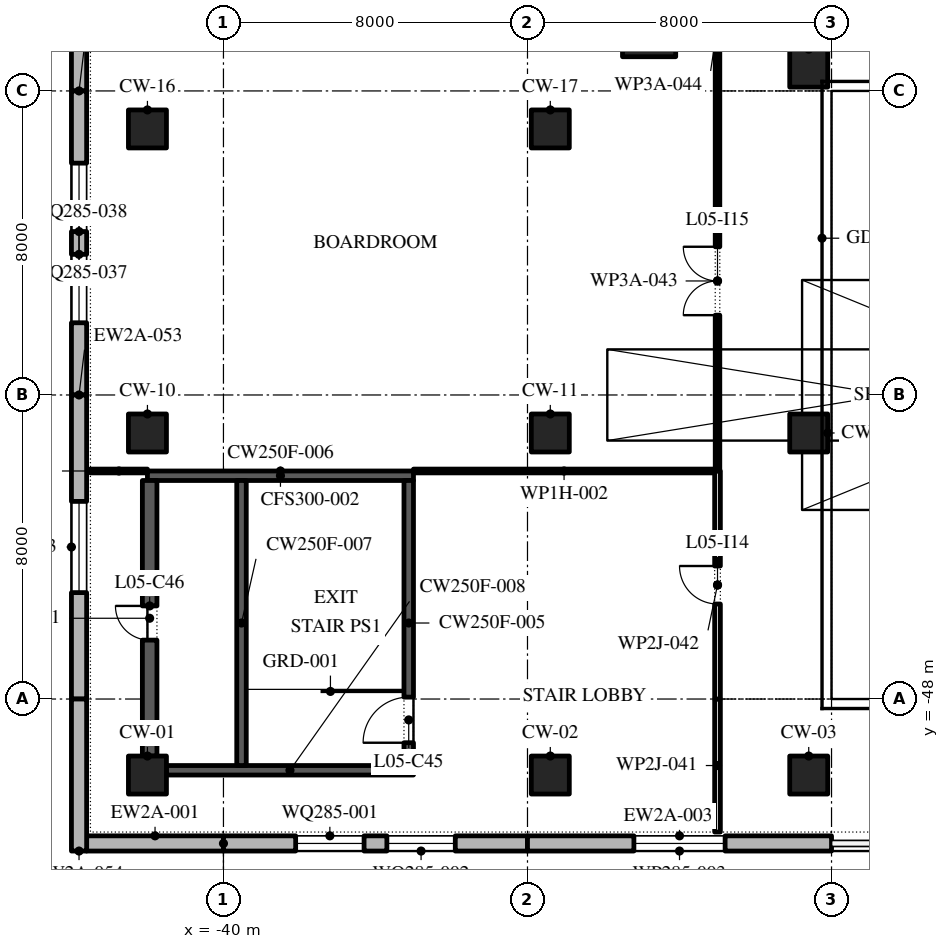
"""IFC4 building model, lengths in metres.
Left out: names, types, materials, properties, quantities, classifications, styles, units other than length and angle.
Written with IfcOpenShell. Run it as: python <this file> out.ifc"""

import sys

from ifc_helpers import new_model, si_unit, direction, frame, frame_2d, origin, origin_2d, place, context, subcontext, project, spatial, polyline, rectangle, outline, extrude, element, fill, save


model = new_model("IFC4")
c1 = context("Model", 3, precision=1e-05, world=origin(), true_north=direction((0.0, 1.0)))
c2 = subcontext(c1, "Body", "Model", "MODEL_VIEW")
j1 = project(units=[si_unit("LENGTHUNIT", "METRE"), si_unit("PLANEANGLEUNIT", "RADIAN")], contexts=[c1])
p1 = place(None, origin())
s1 = spatial("IfcSite", under=j1, at=p1, CompositionType="ELEMENT")
p2 = place(p1, origin())
s2 = spatial("IfcBuilding", under=s1, at=p2, CompositionType="ELEMENT")
p3 = place(p2, frame((0.0, 0.0, 28.8)))
s3 = spatial("IfcBuildingStorey", under=s2, at=p3, CompositionType="ELEMENT", Elevation=28.8)
for number, where, z_axis, x_axis in (
    (1, (-42.0, -50.0, 0.0), (0.0, 0.0, 1.0), (1.0, 0.0, 0.0)),
    (2, (-31.4, -50.0, 0.0), (0.0, 0.0, 1.0), (1.0, 0.0, 0.0)),
    (3, (-24.6, -50.0, 0.0), (0.0, 0.0, 1.0), (1.0, 0.0, 0.0)),
    (4, (-42.0, -41.0, 0.0), (0.0, 0.0, 1.0), (1.0, 0.0, 0.0)),
    (5, (-31.4, -41.0, 0.0), (0.0, 0.0, 1.0), (1.0, 0.0, 0.0)),
    (6, (-24.6, -41.0, 0.0), (0.0, 0.0, 1.0), (1.0, 0.0, 0.0)),
    (7, (-42.0, -33.0, 0.0), (0.0, 0.0, 1.0), (1.0, 0.0, 0.0)),
    (8, (-31.4, -33.0, 0.0), (0.0, 0.0, 1.0), (1.0, 0.0, 0.0)),
    (9, (-24.6, -31.4, 0.0), (0.0, 0.0, 1.0), (1.0, 0.0, 0.0)),
):
    element("IfcColumn", number, at=place(p3, frame(where, z_axis=z_axis, x_axis=x_axis)), inside=s3, PredefinedType="COLUMN", context=c2, shape_type="SweptSolid", body=[
        extrude(rectangle(XDim=1.0, YDim=1.0, at=origin_2d()), origin(), (0.0, 0.0, 1.0), 4.35),
    ])
p4 = place(p3, frame((-28.8, -30.4, 0.0), z_axis=(0.0, 0.0, 1.0), x_axis=(1.0, 0.0, 0.0)))
e10 = element("IfcColumn", 10, at=p4, inside=s3, PredefinedType="COLUMN", context=c2, shape_type="SweptSolid", body=[
    extrude(rectangle(XDim=1.4, YDim=1.4, at=origin_2d()), origin(), (0.0, 0.0, 1.0), 4.8),
])
p5 = place(p3, frame((-43.6, -51.8, 0.0), z_axis=(0.0, 0.0, 1.0), x_axis=(1.0, 0.0, 0.0)))
e11 = element("IfcWall", 11, at=p5, inside=s3, PredefinedType="STANDARD", context=c2, shape_type="SweptSolid", body=[
    extrude(rectangle(XDim=3.6, YDim=0.4, at=frame_2d((1.8, 0.0))), origin(), (0.0, 0.0, 1.0), 4.35),
])
p6 = place(p3, frame((-40.0, -51.8, 0.0), z_axis=(0.0, 0.0, 1.0), x_axis=(1.0, 0.0, 0.0)))
e12 = element("IfcWall", 12, at=p6, inside=s3, PredefinedType="STANDARD", context=c2, shape_type="SweptSolid", body=[
    extrude(rectangle(XDim=8.0, YDim=0.4, at=frame_2d((4.0, 0.0))), origin(), (0.0, 0.0, 1.0), 4.35),
])
p7 = place(p6, frame((1.9, 0.0, 0.9)))
e13 = element("IfcOpeningElement", 13, at=p7, cuts=e12, PredefinedType="OPENING", context=c2, shape_type="SweptSolid", body=[
    extrude(outline(polyline([(0.0, 0.0), (1.8, 0.0), (1.8, 1.425), (1.784, 1.646), (1.738, 1.864), (1.661, 2.072), (1.556, 2.268), (1.425, 2.447), (1.269, 2.605), (1.093, 2.741), (0.9, 2.85), (0.707, 2.741), (0.531, 2.605), (0.375, 2.447), (0.244, 2.268), (0.139, 2.072), (0.062, 1.864), (0.016, 1.646), (0.0, 1.425), (0.0, 0.0)])), frame((0.0, 0.21, 0.0), z_axis=(0.0, -1.0, 0.0), x_axis=(1.0, 0.0, 0.0)), (0.0, 0.0, 1.0), 0.42),
])
p8 = place(p6, frame((4.3, 0.0, 0.9)))
e14 = element("IfcOpeningElement", 14, at=p8, cuts=e12, PredefinedType="OPENING", context=c2, shape_type="SweptSolid", body=[
    extrude(outline(polyline([(0.0, 0.0), (1.8, 0.0), (1.8, 1.425), (1.784, 1.646), (1.738, 1.864), (1.661, 2.072), (1.556, 2.268), (1.425, 2.447), (1.269, 2.605), (1.093, 2.741), (0.9, 2.85), (0.707, 2.741), (0.531, 2.605), (0.375, 2.447), (0.244, 2.268), (0.139, 2.072), (0.062, 1.864), (0.016, 1.646), (0.0, 1.425), (0.0, 0.0)])), frame((0.0, 0.21, 0.0), z_axis=(0.0, -1.0, 0.0), x_axis=(1.0, 0.0, 0.0)), (0.0, 0.0, 1.0), 0.42),
])
p9 = place(p3, frame((-32.0, -51.8, 0.0), z_axis=(0.0, 0.0, 1.0), x_axis=(1.0, 0.0, 0.0)))
e15 = element("IfcWall", 15, at=p9, inside=s3, PredefinedType="STANDARD", context=c2, shape_type="SweptSolid", body=[
    extrude(rectangle(XDim=8.0, YDim=0.4, at=frame_2d((4.0, 0.0))), origin(), (0.0, 0.0, 1.0), 4.35),
])
p10 = place(p9, frame((2.8, 0.0, 0.9)))
e16 = element("IfcOpeningElement", 16, at=p10, cuts=e15, PredefinedType="OPENING", context=c2, shape_type="SweptSolid", body=[
    extrude(outline(polyline([(0.0, 0.0), (2.4, 0.0), (2.4, 1.425), (2.378, 1.677), (2.312, 1.921), (2.205, 2.15), (2.06, 2.356), (1.881, 2.535), (1.674, 2.679), (1.444, 2.785), (1.2, 2.85), (0.956, 2.785), (0.726, 2.679), (0.519, 2.535), (0.34, 2.356), (0.195, 2.15), (0.088, 1.921), (0.022, 1.677), (0.0, 1.425), (0.0, 0.0)])), frame((0.0, 0.21, 0.0), z_axis=(0.0, -1.0, 0.0), x_axis=(1.0, 0.0, 0.0)), (0.0, 0.0, 1.0), 0.42),
])
p11 = place(p3, frame((-43.8, -24.0, 0.0), z_axis=(0.0, 0.0, 1.0), x_axis=(0.0, -1.0, 0.0)))
e17 = element("IfcWall", 17, at=p11, inside=s3, PredefinedType="STANDARD", context=c2, shape_type="SweptSolid", body=[
    extrude(rectangle(XDim=8.0, YDim=0.4, at=frame_2d((4.0, 0.0))), origin(), (0.0, 0.0, 1.0), 4.35),
])
p12 = place(p11, frame((2.8, 0.0, 0.9)))
e18 = element("IfcOpeningElement", 18, at=p12, cuts=e17, PredefinedType="OPENING", context=c2, shape_type="SweptSolid", body=[
    extrude(outline(polyline([(0.0, 0.0), (2.4, 0.0), (2.4, 1.425), (2.378, 1.677), (2.312, 1.921), (2.205, 2.15), (2.06, 2.356), (1.881, 2.535), (1.674, 2.679), (1.444, 2.785), (1.2, 2.85), (0.956, 2.785), (0.726, 2.679), (0.519, 2.535), (0.34, 2.356), (0.195, 2.15), (0.088, 1.921), (0.022, 1.677), (0.0, 1.425), (0.0, 0.0)])), frame((0.0, 0.21, 0.0), z_axis=(0.0, -1.0, 0.0), x_axis=(1.0, 0.0, 0.0)), (0.0, 0.0, 1.0), 0.42),
])
p13 = place(p3, frame((-43.8, -32.0, 0.0), z_axis=(0.0, 0.0, 1.0), x_axis=(0.0, -1.0, 0.0)))
e19 = element("IfcWall", 19, at=p13, inside=s3, PredefinedType="STANDARD", context=c2, shape_type="SweptSolid", body=[
    extrude(rectangle(XDim=8.0, YDim=0.4, at=frame_2d((4.0, 0.0))), origin(), (0.0, 0.0, 1.0), 4.35),
])
p14 = place(p13, frame((1.9, 0.0, 0.9)))
e20 = element("IfcOpeningElement", 20, at=p14, cuts=e19, PredefinedType="OPENING", context=c2, shape_type="SweptSolid", body=[
    extrude(outline(polyline([(0.0, 0.0), (1.8, 0.0), (1.8, 1.425), (1.784, 1.646), (1.738, 1.864), (1.661, 2.072), (1.556, 2.268), (1.425, 2.447), (1.269, 2.605), (1.093, 2.741), (0.9, 2.85), (0.707, 2.741), (0.531, 2.605), (0.375, 2.447), (0.244, 2.268), (0.139, 2.072), (0.062, 1.864), (0.016, 1.646), (0.0, 1.425), (0.0, 0.0)])), frame((0.0, 0.21, 0.0), z_axis=(0.0, -1.0, 0.0), x_axis=(1.0, 0.0, 0.0)), (0.0, 0.0, 1.0), 0.42),
])
p15 = place(p13, frame((4.3, 0.0, 0.9)))
e21 = element("IfcOpeningElement", 21, at=p15, cuts=e19, PredefinedType="OPENING", context=c2, shape_type="SweptSolid", body=[
    extrude(outline(polyline([(0.0, 0.0), (1.8, 0.0), (1.8, 1.425), (1.784, 1.646), (1.738, 1.864), (1.661, 2.072), (1.556, 2.268), (1.425, 2.447), (1.269, 2.605), (1.093, 2.741), (0.9, 2.85), (0.707, 2.741), (0.531, 2.605), (0.375, 2.447), (0.244, 2.268), (0.139, 2.072), (0.062, 1.864), (0.016, 1.646), (0.0, 1.425), (0.0, 0.0)])), frame((0.0, 0.21, 0.0), z_axis=(0.0, -1.0, 0.0), x_axis=(1.0, 0.0, 0.0)), (0.0, 0.0, 1.0), 0.42),
])
p16 = place(p3, frame((-43.8, -40.0, 0.0), z_axis=(0.0, 0.0, 1.0), x_axis=(0.0, -1.0, 0.0)))
e22 = element("IfcWall", 22, at=p16, inside=s3, PredefinedType="STANDARD", context=c2, shape_type="SweptSolid", body=[
    extrude(rectangle(XDim=8.0, YDim=0.4, at=frame_2d((4.0, 0.0))), origin(), (0.0, 0.0, 1.0), 4.35),
])
p17 = place(p16, frame((2.8, 0.0, 0.9)))
e23 = element("IfcOpeningElement", 23, at=p17, cuts=e22, PredefinedType="OPENING", context=c2, shape_type="SweptSolid", body=[
    extrude(outline(polyline([(0.0, 0.0), (2.4, 0.0), (2.4, 1.425), (2.378, 1.677), (2.312, 1.921), (2.205, 2.15), (2.06, 2.356), (1.881, 2.535), (1.674, 2.679), (1.444, 2.785), (1.2, 2.85), (0.956, 2.785), (0.726, 2.679), (0.519, 2.535), (0.34, 2.356), (0.195, 2.15), (0.088, 1.921), (0.022, 1.677), (0.0, 1.425), (0.0, 0.0)])), frame((0.0, 0.21, 0.0), z_axis=(0.0, -1.0, 0.0), x_axis=(1.0, 0.0, 0.0)), (0.0, 0.0, 1.0), 0.42),
])
p18 = place(p3, frame((-43.8, -48.0, 0.0), z_axis=(0.0, 0.0, 1.0), x_axis=(0.0, -1.0, 0.0)))
e24 = element("IfcWall", 24, at=p18, inside=s3, PredefinedType="STANDARD", context=c2, shape_type="SweptSolid", body=[
    extrude(rectangle(XDim=4.0, YDim=0.4, at=frame_2d((2.0, 0.0))), origin(), (0.0, 0.0, 1.0), 4.35),
])
p19 = place(p3, frame((-41.5, -49.875, 0.0), z_axis=(0.0, 0.0, 1.0), x_axis=(1.0, 0.0, 0.0)))
e25 = element("IfcWall", 25, at=p19, inside=s3, PredefinedType="SHEAR", context=c2, shape_type="SweptSolid", body=[
    extrude(rectangle(XDim=6.5, YDim=0.25, at=frame_2d((3.25, 0.0))), origin(), (0.0, 0.0, 1.0), 4.35),
])
p20 = place(p3, frame((-42.0, -42.125, 0.0), z_axis=(0.0, 0.0, 1.0), x_axis=(1.0, 0.0, 0.0)))
e26 = element("IfcWall", 26, at=p20, inside=s3, PredefinedType="SHEAR", context=c2, shape_type="SweptSolid", body=[
    extrude(rectangle(XDim=7.0, YDim=0.25, at=frame_2d((3.5, 0.0))), origin(), (0.0, 0.0, 1.0), 4.35),
])
p21 = place(p3, frame((-41.942, -49.5, 0.0), z_axis=(0.0, 0.0, 1.0), x_axis=(0.0, 1.0, 0.0)))
e27 = element("IfcWall", 27, at=p21, inside=s3, PredefinedType="SHEAR", context=c2, shape_type="SweptSolid", body=[
    extrude(rectangle(XDim=7.25, YDim=0.384, at=frame_2d((3.625, 0.0))), origin(), (0.0, 0.0, 1.0), 4.35),
])
p22 = place(p21, frame((3.05, 0.0, 0.0)))
e28 = element("IfcOpeningElement", 28, at=p22, cuts=e27, PredefinedType="OPENING", context=c2, shape_type="SweptSolid", body=[
    extrude(rectangle(XDim=0.9, YDim=2.1, at=frame_2d((0.45, 1.05))), frame((0.0, 0.202, 0.0), z_axis=(0.0, -1.0, 0.0), x_axis=(1.0, 0.0, 0.0)), (0.0, 0.0, 1.0), 0.404),
])
p23 = place(p3, frame((-35.125, -49.75, 0.0), z_axis=(0.0, 0.0, 1.0), x_axis=(0.0, 1.0, 0.0)))
e29 = element("IfcWall", 29, at=p23, inside=s3, PredefinedType="SHEAR", context=c2, shape_type="SweptSolid", body=[
    extrude(rectangle(XDim=7.5, YDim=0.25, at=frame_2d((3.75, 0.0))), origin(), (0.0, 0.0, 1.0), 4.35),
])
p24 = place(p23, frame((0.6, 0.0, 0.0)))
e30 = element("IfcOpeningElement", 30, at=p24, cuts=e29, PredefinedType="OPENING", context=c2, shape_type="SweptSolid", body=[
    extrude(rectangle(XDim=1.2, YDim=2.1, at=frame_2d((0.6, 1.05))), frame((0.0, 0.135, 0.0), z_axis=(0.0, -1.0, 0.0), x_axis=(1.0, 0.0, 0.0)), (0.0, 0.0, 1.0), 0.27),
])
p25 = place(p3, frame((-39.525, -49.75, 0.0), z_axis=(0.0, 0.0, 1.0), x_axis=(0.0, 1.0, 0.0)))
e31 = element("IfcWall", 31, at=p25, inside=s3, PredefinedType="SHEAR", context=c2, shape_type="SweptSolid", body=[
    extrude(rectangle(XDim=7.5, YDim=0.25, at=frame_2d((3.75, 0.0))), origin(), (0.0, 0.0, 1.0), 4.35),
])
p26 = place(p3, frame((-43.5, -42.0, 0.0), z_axis=(0.0, 0.0, 1.0), x_axis=(1.0, 0.0, 0.0)))
e32 = element("IfcWall", 32, at=p26, inside=s3, PredefinedType="PARTITIONING", context=c2, shape_type="SweptSolid", body=[
    extrude(rectangle(XDim=1.5, YDim=0.1, at=frame_2d((0.75, 0.0))), origin(), (0.0, 0.0, 1.0), 4.35),
])
p27 = place(p3, frame((-35.0, -42.0, 0.0), z_axis=(0.0, 0.0, 1.0), x_axis=(1.0, 0.0, 0.0)))
e33 = element("IfcWall", 33, at=p27, inside=s3, PredefinedType="PARTITIONING", context=c2, shape_type="SweptSolid", body=[
    extrude(rectangle(XDim=7.925, YDim=0.1, at=frame_2d((3.962, 0.0))), origin(), (0.0, 0.0, 1.0), 4.35),
])
p28 = place(p3, frame((-27.0, -51.5, 0.0), z_axis=(0.0, 0.0, 1.0), x_axis=(0.0, 1.0, 0.0)))
e34 = element("IfcWall", 34, at=p28, inside=s3, PredefinedType="PARTITIONING", context=c2, shape_type="SweptSolid", body=[
    extrude(rectangle(XDim=3.5, YDim=0.15, at=frame_2d((1.75, 0.0))), origin(), (0.0, 0.0, 1.0), 4.35),
])
p29 = place(p3, frame((-27.0, -48.0, 0.0), z_axis=(0.0, 0.0, 1.0), x_axis=(0.0, 1.0, 0.0)))
e35 = element("IfcWall", 35, at=p29, inside=s3, PredefinedType="PARTITIONING", context=c2, shape_type="SweptSolid", body=[
    extrude(rectangle(XDim=6.0, YDim=0.15, at=frame_2d((3.0, 0.0))), origin(), (0.0, 0.0, 1.0), 4.35),
])
p30 = place(p29, frame((2.5, 0.0, 0.0)))
e36 = element("IfcOpeningElement", 36, at=p30, cuts=e35, PredefinedType="OPENING", context=c2, shape_type="SweptSolid", body=[
    extrude(rectangle(XDim=1.0, YDim=2.1, at=frame_2d((0.5, 1.05))), frame((0.0, 0.085, 0.0), z_axis=(0.0, -1.0, 0.0), x_axis=(1.0, 0.0, 0.0)), (0.0, 0.0, 1.0), 0.17),
])
p31 = place(p3, frame((-27.0, -42.0, 0.0), z_axis=(0.0, 0.0, 1.0), x_axis=(0.0, 1.0, 0.0)))
e37 = element("IfcWall", 37, at=p31, inside=s3, PredefinedType="PARTITIONING", context=c2, shape_type="SweptSolid", body=[
    extrude(rectangle(XDim=10.0, YDim=0.12, at=frame_2d((5.0, 0.0))), origin(), (0.0, 0.0, 1.0), 4.35),
])
p32 = place(p31, frame((4.1, 0.0, 0.0)))
e38 = element("IfcOpeningElement", 38, at=p32, cuts=e37, PredefinedType="OPENING", context=c2, shape_type="SweptSolid", body=[
    extrude(rectangle(XDim=1.8, YDim=2.1, at=frame_2d((0.9, 1.05))), frame((0.0, 0.07, 0.0), z_axis=(0.0, -1.0, 0.0), x_axis=(1.0, 0.0, 0.0)), (0.0, 0.0, 1.0), 0.14),
])
p33 = place(p3, frame((-27.0, -32.0, 0.0), z_axis=(0.0, 0.0, 1.0), x_axis=(0.0, 1.0, 0.0)))
e39 = element("IfcWall", 39, at=p33, inside=s3, PredefinedType="PARTITIONING", context=c2, shape_type="SweptSolid", body=[
    extrude(rectangle(XDim=3.44, YDim=0.12, at=frame_2d((1.72, 0.0))), origin(), (0.0, 0.0, 1.0), 4.35),
])
p34 = place(p7, origin())
e40 = element("IfcWindow", 40, at=p34, inside=s3, PartitioningType="DOUBLE_PANEL_VERTICAL", PredefinedType="WINDOW", context=c2, shape_type="SweptSolid", body=[
    extrude(outline(polyline([(0.0, 0.0), (1.8, 0.0), (1.8, 1.425), (1.784, 1.646), (1.738, 1.864), (1.661, 2.072), (1.556, 2.268), (1.425, 2.447), (1.269, 2.605), (1.093, 2.741), (0.9, 2.85), (0.707, 2.741), (0.531, 2.605), (0.375, 2.447), (0.244, 2.268), (0.139, 2.072), (0.062, 1.864), (0.016, 1.646), (0.0, 1.425), (0.0, 0.0)])), frame((0.0, 0.03, 0.0), z_axis=(0.0, -1.0, 0.0), x_axis=(1.0, 0.0, 0.0)), (0.0, 0.0, 1.0), 0.06),
])
fill(e13, e40)
p35 = place(p8, origin())
e41 = element("IfcWindow", 41, at=p35, inside=s3, PartitioningType="DOUBLE_PANEL_VERTICAL", PredefinedType="WINDOW", context=c2, shape_type="SweptSolid", body=[
    extrude(outline(polyline([(0.0, 0.0), (1.8, 0.0), (1.8, 1.425), (1.784, 1.646), (1.738, 1.864), (1.661, 2.072), (1.556, 2.268), (1.425, 2.447), (1.269, 2.605), (1.093, 2.741), (0.9, 2.85), (0.707, 2.741), (0.531, 2.605), (0.375, 2.447), (0.244, 2.268), (0.139, 2.072), (0.062, 1.864), (0.016, 1.646), (0.0, 1.425), (0.0, 0.0)])), frame((0.0, 0.03, 0.0), z_axis=(0.0, -1.0, 0.0), x_axis=(1.0, 0.0, 0.0)), (0.0, 0.0, 1.0), 0.06),
])
fill(e14, e41)
p36 = place(p10, origin())
e42 = element("IfcWindow", 42, at=p36, inside=s3, PartitioningType="DOUBLE_PANEL_VERTICAL", PredefinedType="WINDOW", context=c2, shape_type="SweptSolid", body=[
    extrude(outline(polyline([(0.0, 0.0), (2.4, 0.0), (2.4, 1.425), (2.378, 1.677), (2.312, 1.921), (2.205, 2.15), (2.06, 2.356), (1.881, 2.535), (1.674, 2.679), (1.444, 2.785), (1.2, 2.85), (0.956, 2.785), (0.726, 2.679), (0.519, 2.535), (0.34, 2.356), (0.195, 2.15), (0.088, 1.921), (0.022, 1.677), (0.0, 1.425), (0.0, 0.0)])), frame((0.0, 0.03, 0.0), z_axis=(0.0, -1.0, 0.0), x_axis=(1.0, 0.0, 0.0)), (0.0, 0.0, 1.0), 0.06),
])
fill(e16, e42)
p37 = place(p14, origin())
e43 = element("IfcWindow", 43, at=p37, inside=s3, PartitioningType="DOUBLE_PANEL_VERTICAL", PredefinedType="WINDOW", context=c2, shape_type="SweptSolid", body=[
    extrude(outline(polyline([(0.0, 0.0), (1.8, 0.0), (1.8, 1.425), (1.784, 1.646), (1.738, 1.864), (1.661, 2.072), (1.556, 2.268), (1.425, 2.447), (1.269, 2.605), (1.093, 2.741), (0.9, 2.85), (0.707, 2.741), (0.531, 2.605), (0.375, 2.447), (0.244, 2.268), (0.139, 2.072), (0.062, 1.864), (0.016, 1.646), (0.0, 1.425), (0.0, 0.0)])), frame((0.0, 0.03, 0.0), z_axis=(0.0, -1.0, 0.0), x_axis=(1.0, 0.0, 0.0)), (0.0, 0.0, 1.0), 0.06),
])
fill(e20, e43)
p38 = place(p15, origin())
e44 = element("IfcWindow", 44, at=p38, inside=s3, PartitioningType="DOUBLE_PANEL_VERTICAL", PredefinedType="WINDOW", context=c2, shape_type="SweptSolid", body=[
    extrude(outline(polyline([(0.0, 0.0), (1.8, 0.0), (1.8, 1.425), (1.784, 1.646), (1.738, 1.864), (1.661, 2.072), (1.556, 2.268), (1.425, 2.447), (1.269, 2.605), (1.093, 2.741), (0.9, 2.85), (0.707, 2.741), (0.531, 2.605), (0.375, 2.447), (0.244, 2.268), (0.139, 2.072), (0.062, 1.864), (0.016, 1.646), (0.0, 1.425), (0.0, 0.0)])), frame((0.0, 0.03, 0.0), z_axis=(0.0, -1.0, 0.0), x_axis=(1.0, 0.0, 0.0)), (0.0, 0.0, 1.0), 0.06),
])
fill(e21, e44)
p39 = place(p17, origin())
e45 = element("IfcWindow", 45, at=p39, inside=s3, PartitioningType="DOUBLE_PANEL_VERTICAL", PredefinedType="WINDOW", context=c2, shape_type="SweptSolid", body=[
    extrude(outline(polyline([(0.0, 0.0), (2.4, 0.0), (2.4, 1.425), (2.378, 1.677), (2.312, 1.921), (2.205, 2.15), (2.06, 2.356), (1.881, 2.535), (1.674, 2.679), (1.444, 2.785), (1.2, 2.85), (0.956, 2.785), (0.726, 2.679), (0.519, 2.535), (0.34, 2.356), (0.195, 2.15), (0.088, 1.921), (0.022, 1.677), (0.0, 1.425), (0.0, 0.0)])), frame((0.0, 0.03, 0.0), z_axis=(0.0, -1.0, 0.0), x_axis=(1.0, 0.0, 0.0)), (0.0, 0.0, 1.0), 0.06),
])
fill(e23, e45)
p40 = place(p3, frame((0.0, 0.0, 4.4)))
p41 = place(p40, frame((-22.5, -40.0, 0.0)))
p42 = place(p41, frame((0.0, 0.0, 0.35)))
e46 = element("IfcWindow", 46, at=p42, inside=s3, PartitioningType="SINGLE_PANEL", PredefinedType="SKYLIGHT", context=c2, shape_type="SweptSolid", body=[
    extrude(rectangle(XDim=2.4, YDim=14.8, at=origin_2d()), origin(), (0.0, 0.0, 1.0), 0.05),
])
p43 = place(p24, origin())
e47 = element("IfcDoor", 47, at=p43, inside=s3, OperationType="SINGLE_SWING_RIGHT", PredefinedType="DOOR", context=c2, shape_type="SweptSolid", body=[
    extrude(rectangle(XDim=1.2, YDim=2.1, at=frame_2d((0.6, 1.05))), frame((0.0, 0.025, 0.0), z_axis=(0.0, -1.0, 0.0), x_axis=(1.0, 0.0, 0.0)), (0.0, 0.0, 1.0), 0.05),
])
fill(e30, e47)
p44 = place(p22, origin())
e48 = element("IfcDoor", 48, at=p44, inside=s3, OperationType="SINGLE_SWING_LEFT", PredefinedType="DOOR", context=c2, shape_type="SweptSolid", body=[
    extrude(rectangle(XDim=0.9, YDim=2.1, at=frame_2d((0.45, 1.05))), frame((0.0, -0.142, 0.0), z_axis=(0.0, -1.0, 0.0), x_axis=(1.0, 0.0, 0.0)), (0.0, 0.0, 1.0), 0.05),
])
fill(e28, e48)
p45 = place(p30, origin())
e49 = element("IfcDoor", 49, at=p45, inside=s3, OperationType="SINGLE_SWING_LEFT", PredefinedType="DOOR", context=c2, shape_type="SweptSolid", body=[
    extrude(rectangle(XDim=1.0, YDim=2.1, at=frame_2d((0.5, 1.05))), frame((0.0, 0.025, 0.0), z_axis=(0.0, -1.0, 0.0), x_axis=(1.0, 0.0, 0.0)), (0.0, 0.0, 1.0), 0.05),
])
fill(e36, e49)
p46 = place(p32, origin())
e50 = element("IfcDoor", 50, at=p46, inside=s3, OperationType="SINGLE_SWING_LEFT", PredefinedType="DOOR", context=c2, shape_type="SweptSolid", body=[
    extrude(rectangle(XDim=1.8, YDim=2.1, at=frame_2d((0.9, 1.05))), frame((0.0, 0.025, 0.0), z_axis=(0.0, -1.0, 0.0), x_axis=(1.0, 0.0, 0.0)), (0.0, 0.0, 1.0), 0.05),
])
fill(e38, e50)
save(model, sys.argv[1])
